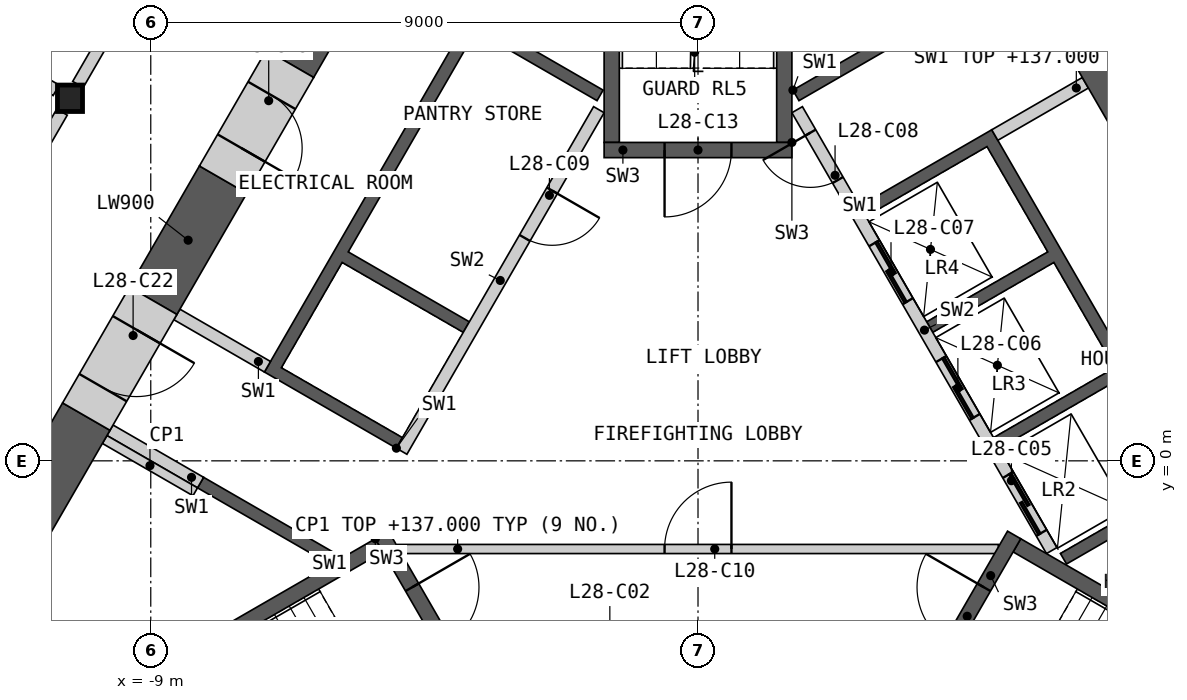
"""IFC4 building model, lengths in metres.
Left out: names, types, materials, properties, quantities, classifications, styles, units other than length and angle.
Written with IfcOpenShell. Run it as: python <this file> out.ifc"""

import sys

from ifc_helpers import new_model, si_unit, direction, frame, frame_2d, origin, origin_2d, place, context, subcontext, project, spatial, polyline, rectangle, i_section, outline, extrude, element, fill, save


model = new_model("IFC4")
c1 = context("Model", 3, precision=1e-05, world=origin(), true_north=direction((0.0, 1.0)))
c2 = subcontext(c1, "Body", "Model", "MODEL_VIEW")
j1 = project(units=[si_unit("LENGTHUNIT", "METRE"), si_unit("PLANEANGLEUNIT", "RADIAN")], contexts=[c1])
p1 = place(None, origin())
s1 = spatial("IfcSite", under=j1, at=p1, CompositionType="ELEMENT")
p2 = place(p1, origin())
s2 = spatial("IfcBuilding", under=s1, at=p2, CompositionType="ELEMENT")
p3 = place(p2, frame((0.0, 0.0, 133.2)))
s3 = spatial("IfcBuildingStorey", under=s2, at=p3, CompositionType="ELEMENT", Elevation=133.2)
p4 = place(p3, frame((-10.328, 5.963, 0.0), z_axis=(0.0, 0.0, 1.0), x_axis=(1.0, 0.0, 0.0)))
e1 = element("IfcColumn", 1, at=p4, inside=s3, PredefinedType="COLUMN", context=c2, shape_type="SweptSolid", body=[
    extrude(i_section(OverallWidth=0.412, OverallDepth=0.435, WebThickness=0.036, FlangeThickness=0.057, at=origin_2d()), origin(), (0.0, 0.0, 1.0), 4.2),
])
p5 = place(p3, origin())
e2 = element("IfcWall", 2, at=p5, inside=s3, PredefinedType="SHEAR", context=c2, shape_type="SweptSolid", body=[
    extrude(outline(polyline([(1.561, 6.097), (3.731, 7.35), (3.831, 7.177), (1.66, 5.924), (1.561, 6.097)])), origin(), (0.0, 0.0, 1.0), 3.8),
])
p6 = place(p3, origin())
e3 = element("IfcWall", 3, at=p6, inside=s3, PredefinedType="SHEAR", context=c2, shape_type="SweptSolid", body=[
    extrude(outline(polyline([(2.66, 4.192), (4.831, 5.445), (8.231, -0.444), (6.061, -1.697), (5.96, -1.524), (7.952, -0.374), (6.952, 1.358), (4.96, 0.208), (4.861, 0.381), (6.852, 1.531), (5.852, 3.263), (3.861, 2.113), (3.76, 2.287), (5.752, 3.437), (4.752, 5.169), (2.76, 4.019), (2.66, 4.192)])), origin(), (0.0, 0.0, 1.0), 3.8),
])
p7 = place(p3, frame((5.817, -1.476, 0.0), z_axis=(0.0, 0.0, 1.0), x_axis=(-0.500002616675, 0.866023893041, 0.0)))
e4 = element("IfcWall", 4, at=p7, inside=s3, PredefinedType="SOLIDWALL", context=c2, shape_type="SweptSolid", body=[
    extrude(rectangle(XDim=8.373, YDim=0.2, at=frame_2d((4.187, 0.0))), origin(), (0.0, 0.0, 1.0), 3.8),
])
p8 = place(p7, frame((0.337, 0.0, 0.0)))
e5 = element("IfcOpeningElement", 5, at=p8, cuts=e4, PredefinedType="OPENING", context=c2, shape_type="SweptSolid", body=[
    extrude(rectangle(XDim=1.1, YDim=2.1, at=frame_2d((0.55, 1.05))), frame((0.0, 0.11, 0.0), z_axis=(0.0, -1.0, 0.0), x_axis=(1.0, 0.0, 0.0)), (0.0, 0.0, 1.0), 0.22),
])
p9 = place(p7, frame((2.537, 0.0, 0.0)))
e6 = element("IfcOpeningElement", 6, at=p9, cuts=e4, PredefinedType="OPENING", context=c2, shape_type="SweptSolid", body=[
    extrude(rectangle(XDim=1.1, YDim=2.1, at=frame_2d((0.55, 1.05))), frame((0.0, 0.11, 0.0), z_axis=(0.0, -1.0, 0.0), x_axis=(1.0, 0.0, 0.0)), (0.0, 0.0, 1.0), 0.22),
])
p10 = place(p7, frame((4.737, 0.0, 0.0)))
e7 = element("IfcOpeningElement", 7, at=p10, cuts=e4, PredefinedType="OPENING", context=c2, shape_type="SweptSolid", body=[
    extrude(rectangle(XDim=1.1, YDim=2.1, at=frame_2d((0.55, 1.05))), frame((0.0, 0.11, 0.0), z_axis=(0.0, -1.0, 0.0), x_axis=(1.0, 0.0, 0.0)), (0.0, 0.0, 1.0), 0.22),
])
p11 = place(p7, frame((7.037, 0.0, 0.0)))
e8 = element("IfcOpeningElement", 8, at=p11, cuts=e4, PredefinedType="OPENING", context=c2, shape_type="SweptSolid", body=[
    extrude(rectangle(XDim=0.9, YDim=2.1, at=frame_2d((0.45, 1.05))), frame((0.0, 0.11, 0.0), z_axis=(0.0, -1.0, 0.0), x_axis=(1.0, 0.0, 0.0)), (0.0, 0.0, 1.0), 0.22),
])
p12 = place(p3, frame((4.881, 5.358, 0.0), z_axis=(0.0, 0.0, 1.0), x_axis=(0.866024871741, 0.500000921525, 0.0)))
e9 = element("IfcWall", 9, at=p12, inside=s3, PredefinedType="SHEAR", context=c2, shape_type="SweptSolid", body=[
    extrude(rectangle(XDim=1.72, YDim=0.2, at=frame_2d((0.86, 0.0))), origin(), (0.0, 0.0, 1.0), 3.8),
])
p13 = place(p3, origin())
e10 = element("IfcWall", 10, at=p13, inside=s3, PredefinedType="SHEAR", context=c2, shape_type="SweptSolid", body=[
    extrude(outline(polyline([(-6.061, -1.697), (-8.231, -0.444), (-8.131, -0.271), (-5.96, -1.524), (-6.061, -1.697)])), origin(), (0.0, 0.0, 1.0), 3.8),
])
p14 = place(p3, origin())
e11 = element("IfcWall", 11, at=p14, inside=s3, PredefinedType="SHEAR", context=c2, shape_type="SweptSolid", body=[
    extrude(outline(polyline([(-4.96, 0.208), (-7.131, 1.461), (-3.731, 7.35), (-1.561, 6.097), (-1.66, 5.924), (-3.652, 7.074), (-5.752, 3.437), (-3.76, 2.287), (-3.861, 2.113), (-5.852, 3.263), (-6.852, 1.531), (-4.861, 0.381), (-4.96, 0.208)])), origin(), (0.0, 0.0, 1.0), 3.8),
])
p15 = place(p3, frame((-1.631, 5.776, 0.0), z_axis=(0.0, 0.0, 1.0), x_axis=(-0.499992876559, -0.866029516466, 0.0)))
e12 = element("IfcWall", 12, at=p15, inside=s3, PredefinedType="SOLIDWALL", context=c2, shape_type="SweptSolid", body=[
    extrude(rectangle(XDim=6.486, YDim=0.2, at=frame_2d((3.243, 0.0))), origin(), (0.0, 0.0, 1.0), 3.8),
])
p16 = place(p15, frame((1.537, 0.0, 0.0)))
e13 = element("IfcOpeningElement", 13, at=p16, cuts=e12, PredefinedType="OPENING", context=c2, shape_type="SweptSolid", body=[
    extrude(rectangle(XDim=0.9, YDim=2.1, at=frame_2d((0.45, 1.05))), frame((0.0, 0.11, 0.0), z_axis=(0.0, -1.0, 0.0), x_axis=(1.0, 0.0, 0.0)), (0.0, 0.0, 1.0), 0.22),
])
for number, where, z_axis, x_axis in (
    (14, (-7.081, 1.548, 0.0), (0.0, 0.0, 1.0), (-0.866, 0.5, 0.0)),
    (15, (-8.181, -0.357, 0.0), (0.0, 0.0, 1.0), (-0.866, 0.5, 0.0)),
):
    element("IfcWall", number, at=place(p3, frame(where, z_axis=z_axis, x_axis=x_axis)), inside=s3, PredefinedType="SHEAR", context=c2, shape_type="SweptSolid", body=[
        extrude(rectangle(XDim=1.72, YDim=0.2, at=frame_2d((0.86, 0.0))), origin(), (0.0, 0.0, 1.0), 3.8),
    ])
p17 = place(p3, frame((-4.941, -1.45, 0.0), z_axis=(0.0, 0.0, 1.0), x_axis=(1.0, 0.0, 0.0)))
e16 = element("IfcWall", 16, at=p17, inside=s3, PredefinedType="PARTITIONING", context=c2, shape_type="SweptSolid", body=[
    extrude(rectangle(XDim=9.882, YDim=0.15, at=frame_2d((4.941, 0.0))), origin(), (0.0, 0.0, 1.0), 3.8),
])
p18 = place(p17, frame((4.391, 0.0, 0.0)))
e17 = element("IfcOpeningElement", 17, at=p18, cuts=e16, PredefinedType="OPENING", context=c2, shape_type="SweptSolid", body=[
    extrude(rectangle(XDim=1.1, YDim=2.1, at=frame_2d((0.55, 1.05))), frame((0.0, 0.085, 0.0), z_axis=(0.0, -1.0, 0.0), x_axis=(1.0, 0.0, 0.0)), (0.0, 0.0, 1.0), 0.17),
])
p19 = place(p3, origin())
e18 = element("IfcWall", 18, at=p19, inside=s3, PredefinedType="SHEAR", context=c2, shape_type="SweptSolid", body=[
    extrude(outline(polyline([(-5.307, -1.281), (-10.374, -4.206), (-10.032, -4.298), (-5.182, -1.498), (-5.307, -1.281)])), origin(), (0.0, 0.0, 1.0), 3.8),
])
p20 = place(p3, frame((-5.199, -1.219, 0.0), z_axis=(0.0, 0.0, 1.0), x_axis=(0.499982516597, -0.866035497597, 0.0)))
e19 = element("IfcWall", 19, at=p20, inside=s3, PredefinedType="SHEAR", context=c2, shape_type="SweptSolid", body=[
    extrude(rectangle(XDim=3.088, YDim=0.25, at=frame_2d((1.544, 0.0))), origin(), (0.0, 0.0, 1.0), 3.8),
])
p21 = place(p20, frame((0.994, 0.0, 0.0)))
e20 = element("IfcOpeningElement", 20, at=p21, cuts=e19, PredefinedType="OPENING", context=c2, shape_type="SweptSolid", body=[
    extrude(rectangle(XDim=1.1, YDim=2.1, at=frame_2d((0.55, 1.05))), frame((0.0, 0.135, 0.0), z_axis=(0.0, -1.0, 0.0), x_axis=(1.0, 0.0, 0.0)), (0.0, 0.0, 1.0), 0.27),
])
p22 = place(p3, origin())
e21 = element("IfcWall", 21, at=p22, inside=s3, PredefinedType="SHEAR", context=c2, shape_type="SweptSolid", body=[
    extrude(outline(polyline([(10.032, -4.298), (10.374, -4.206), (5.307, -1.281), (5.182, -1.498), (10.032, -4.298)])), origin(), (0.0, 0.0, 1.0), 3.8),
])
p23 = place(p3, frame((3.655, -3.893, 0.0), z_axis=(0.0, 0.0, 1.0), x_axis=(0.499982516597, 0.866035497597, 0.0)))
e22 = element("IfcWall", 22, at=p23, inside=s3, PredefinedType="SHEAR", context=c2, shape_type="SweptSolid", body=[
    extrude(rectangle(XDim=3.088, YDim=0.25, at=frame_2d((1.544, 0.0))), origin(), (0.0, 0.0, 1.0), 3.8),
])
p24 = place(p23, frame((0.994, 0.0, 0.0)))
e23 = element("IfcOpeningElement", 23, at=p24, cuts=e22, PredefinedType="OPENING", context=c2, shape_type="SweptSolid", body=[
    extrude(rectangle(XDim=1.1, YDim=2.1, at=frame_2d((0.55, 1.05))), frame((0.0, 0.135, 0.0), z_axis=(0.0, -1.0, 0.0), x_axis=(1.0, 0.0, 0.0)), (0.0, 0.0, 1.0), 0.27),
])
p25 = place(p3, origin())
e24 = element("IfcWall", 24, at=p25, inside=s3, PredefinedType="SHEAR", context=c2, shape_type="SweptSolid", body=[
    extrude(outline(polyline([(1.544, 5.237), (1.544, 11.087), (1.294, 10.837), (1.294, 5.237), (1.544, 5.237)])), origin(), (0.0, 0.0, 1.0), 3.8),
])
p26 = place(p3, origin())
e25 = element("IfcWall", 25, at=p26, inside=s3, PredefinedType="SHEAR", context=c2, shape_type="SweptSolid", body=[
    extrude(outline(polyline([(-1.294, 10.837), (-1.544, 11.087), (-1.544, 5.237), (-1.294, 5.237), (-1.294, 10.837)])), origin(), (0.0, 0.0, 1.0), 3.8),
])
p27 = place(p3, frame((1.544, 5.112, 0.0), z_axis=(0.0, 0.0, 1.0), x_axis=(-1.0, 0.0, 0.0)))
e26 = element("IfcWall", 26, at=p27, inside=s3, PredefinedType="SHEAR", context=c2, shape_type="SweptSolid", body=[
    extrude(rectangle(XDim=3.088, YDim=0.25, at=frame_2d((1.544, 0.0))), origin(), (0.0, 0.0, 1.0), 3.8),
])
p28 = place(p27, frame((0.994, 0.0, 0.0)))
e27 = element("IfcOpeningElement", 27, at=p28, cuts=e26, PredefinedType="OPENING", context=c2, shape_type="SweptSolid", body=[
    extrude(rectangle(XDim=1.1, YDim=2.1, at=frame_2d((0.55, 1.05))), frame((0.0, 0.135, 0.0), z_axis=(0.0, -1.0, 0.0), x_axis=(1.0, 0.0, 0.0)), (0.0, 0.0, 1.0), 0.27),
])
p29 = place(p3, frame((-8.268, -0.509, 0.0), z_axis=(0.0, 0.0, 1.0), x_axis=(-0.866024871741, 0.500000921525, 0.0)))
e28 = element("IfcWall", 28, at=p29, inside=s3, PredefinedType="PARTITIONING", context=c2, shape_type="SweptSolid", body=[
    extrude(rectangle(XDim=1.72, YDim=0.15, at=frame_2d((0.86, 0.0))), origin(), (0.0, 0.0, 1.0), 3.8),
])
p30 = place(p3, frame((7.91, 4.451, 0.0), z_axis=(0.0, 0.0, 1.0), x_axis=(-0.500001962043, 0.866024270995, 0.0)))
e29 = element("IfcWall", 29, at=p30, inside=s3, PredefinedType="SHEAR", context=c2, shape_type="SweptSolid", body=[
    extrude(rectangle(XDim=8.796, YDim=0.9, at=frame_2d((4.398, 0.0))), origin(), (0.0, 0.0, 1.0), 3.8),
])
p31 = place(p3, frame((-10.06, 0.728, 0.0), z_axis=(0.0, 0.0, 1.0), x_axis=(-0.499996331799, -0.866027521611, 0.0)))
e30 = element("IfcWall", 30, at=p31, inside=s3, PredefinedType="SHEAR", context=c2, shape_type="SweptSolid", body=[
    extrude(rectangle(XDim=4.295, YDim=0.9, at=frame_2d((2.148, 0.0))), origin(), (0.0, 0.0, 1.0), 3.8),
])
p32 = place(p3, frame((-5.332, 8.917, 0.0), z_axis=(0.0, 0.0, 1.0), x_axis=(-0.499949934511, -0.866054307178, 0.0)))
e31 = element("IfcWall", 31, at=p32, inside=s3, PredefinedType="SHEAR", context=c2, shape_type="SweptSolid", body=[
    extrude(rectangle(XDim=2.756, YDim=0.9, at=frame_2d((1.378, 0.0))), origin(), (0.0, 0.0, 1.0), 3.8),
])
p33 = place(p3, frame((-7.81, 4.625, 0.0), z_axis=(0.0, 0.0, 1.0), x_axis=(-0.499952165731, -0.866053019151, 0.0)))
e32 = element("IfcWall", 32, at=p33, inside=s3, PredefinedType="SHEAR", context=c2, shape_type="SweptSolid", body=[
    extrude(rectangle(XDim=2.3, YDim=0.9, at=frame_2d((1.15, 0.0))), origin(), (0.0, 0.0, 1.0), 3.8),
])
p34 = place(p3, frame((-6.71, 6.53, 0.0), z_axis=(0.0, 0.0, 1.0), x_axis=(-0.50002983664, -0.866008176907, 0.0)))
e33 = element("IfcWall", 33, at=p34, inside=s3, PredefinedType="SHEAR", context=c2, shape_type="SweptSolid", body=[
    extrude(rectangle(XDim=2.2, YDim=0.9, at=frame_2d((1.1, 0.0))), origin(), (0.0, 0.0, 1.0), 3.8),
])
p35 = place(p34, frame((0.6, 0.0, 0.0)))
e34 = element("IfcOpeningElement", 34, at=p35, cuts=e33, PredefinedType="OPENING", context=c2, shape_type="SweptSolid", body=[
    extrude(rectangle(XDim=1.0, YDim=2.1, at=frame_2d((0.5, 1.05))), frame((0.0, 0.46, 0.0), z_axis=(0.0, -1.0, 0.0), x_axis=(1.0, 0.0, 0.0)), (0.0, 0.0, 1.0), 0.92),
])
p36 = place(p3, frame((-8.96, 2.633, 0.0), z_axis=(0.0, 0.0, 1.0), x_axis=(-0.50002983664, -0.866008176907, 0.0)))
e35 = element("IfcWall", 35, at=p36, inside=s3, PredefinedType="SHEAR", context=c2, shape_type="SweptSolid", body=[
    extrude(rectangle(XDim=2.2, YDim=0.9, at=frame_2d((1.1, 0.0))), origin(), (0.0, 0.0, 1.0), 3.8),
])
p37 = place(p36, frame((0.55, 0.0, 0.0)))
e36 = element("IfcOpeningElement", 36, at=p37, cuts=e35, PredefinedType="OPENING", context=c2, shape_type="SweptSolid", body=[
    extrude(rectangle(XDim=1.1, YDim=2.1, at=frame_2d((0.55, 1.05))), frame((0.0, 0.46, 0.0), z_axis=(0.0, -1.0, 0.0), x_axis=(1.0, 0.0, 0.0)), (0.0, 0.0, 1.0), 0.92),
])
p38 = place(p3, frame((-15.361, -2.754, 0.0), z_axis=(0.0, 0.0, 1.0), x_axis=(0.500004141693, 0.866023012564, 0.0)))
e37 = element("IfcWall", 37, at=p38, inside=s3, PredefinedType="PARTITIONING", context=c2, shape_type="SweptSolid", body=[
    extrude(rectangle(XDim=9.803, YDim=0.2, at=frame_2d((4.902, 0.0))), origin(), (0.0, 0.0, 1.0), 3.8),
])
p39 = place(p38, frame((4.452, 0.0, 0.0)))
e38 = element("IfcOpeningElement", 38, at=p39, cuts=e37, PredefinedType="OPENING", context=c2, shape_type="SweptSolid", body=[
    extrude(rectangle(XDim=1.0, YDim=2.1, at=frame_2d((0.5, 1.05))), frame((0.0, 0.11, 0.0), z_axis=(0.0, -1.0, 0.0), x_axis=(1.0, 0.0, 0.0)), (0.0, 0.0, 1.0), 0.22),
])
p40 = place(p3, frame((5.295, 14.68, 0.0), z_axis=(0.0, 0.0, 1.0), x_axis=(0.500012035596, -0.866018454918, 0.0)))
e39 = element("IfcWall", 39, at=p40, inside=s3, PredefinedType="PARTITIONING", context=c2, shape_type="SweptSolid", body=[
    extrude(rectangle(XDim=9.803, YDim=0.2, at=frame_2d((4.902, 0.0))), origin(), (0.0, 0.0, 1.0), 3.8),
])
p41 = place(p40, frame((4.052, 0.0, 0.0)))
e40 = element("IfcOpeningElement", 40, at=p41, cuts=e39, PredefinedType="OPENING", context=c2, shape_type="SweptSolid", body=[
    extrude(rectangle(XDim=1.8, YDim=2.1, at=frame_2d((0.9, 1.05))), frame((0.0, 0.11, 0.0), z_axis=(0.0, -1.0, 0.0), x_axis=(1.0, 0.0, 0.0)), (0.0, 0.0, 1.0), 0.22),
])
p42 = place(p3, frame((-10.197, 6.19, 0.0), z_axis=(0.0, 0.0, 1.0), x_axis=(0.500012035596, 0.866018454918, 0.0)))
e41 = element("IfcWall", 41, at=p42, inside=s3, PredefinedType="PARTITIONING", context=c2, shape_type="SweptSolid", body=[
    extrude(rectangle(XDim=9.803, YDim=0.2, at=frame_2d((4.902, 0.0))), origin(), (0.0, 0.0, 1.0), 3.8),
])
p43 = place(p42, frame((4.452, 0.0, 0.0)))
e42 = element("IfcOpeningElement", 42, at=p43, cuts=e41, PredefinedType="OPENING", context=c2, shape_type="SweptSolid", body=[
    extrude(rectangle(XDim=1.0, YDim=2.1, at=frame_2d((0.5, 1.05))), frame((0.0, 0.11, 0.0), z_axis=(0.0, -1.0, 0.0), x_axis=(1.0, 0.0, 0.0)), (0.0, 0.0, 1.0), 0.22),
])
p44 = place(p3, frame((-21.536, 12.434, 0.0), z_axis=(0.0, 0.0, 1.0), x_axis=(0.86602461759, -0.500001361726, 0.0)))
e43 = element("IfcWall", 43, at=p44, inside=s3, PredefinedType="PARTITIONING", context=c2, shape_type="SweptSolid", body=[
    extrude(rectangle(XDim=12.679, YDim=0.2, at=frame_2d((6.34, 0.0))), origin(), (0.0, 0.0, 1.0), 2.885),
])
p45 = place(p8, origin())
e44 = element("IfcDoor", 44, at=p45, inside=s3, OperationType="SLIDING_TO_LEFT", PredefinedType="DOOR", context=c2, shape_type="SweptSolid", body=[
    extrude(rectangle(XDim=1.1, YDim=2.1, at=frame_2d((0.55, 1.05))), frame((0.0, 0.025, 0.0), z_axis=(0.0, -1.0, 0.0), x_axis=(1.0, 0.0, 0.0)), (0.0, 0.0, 1.0), 0.05),
])
fill(e5, e44)
p46 = place(p9, origin())
e45 = element("IfcDoor", 45, at=p46, inside=s3, OperationType="SLIDING_TO_LEFT", PredefinedType="DOOR", context=c2, shape_type="SweptSolid", body=[
    extrude(rectangle(XDim=1.1, YDim=2.1, at=frame_2d((0.55, 1.05))), frame((0.0, 0.025, 0.0), z_axis=(0.0, -1.0, 0.0), x_axis=(1.0, 0.0, 0.0)), (0.0, 0.0, 1.0), 0.05),
])
fill(e6, e45)
p47 = place(p10, origin())
e46 = element("IfcDoor", 46, at=p47, inside=s3, OperationType="SLIDING_TO_LEFT", PredefinedType="DOOR", context=c2, shape_type="SweptSolid", body=[
    extrude(rectangle(XDim=1.1, YDim=2.1, at=frame_2d((0.55, 1.05))), frame((0.0, 0.025, 0.0), z_axis=(0.0, -1.0, 0.0), x_axis=(1.0, 0.0, 0.0)), (0.0, 0.0, 1.0), 0.05),
])
fill(e7, e46)
p48 = place(p11, origin())
e47 = element("IfcDoor", 47, at=p48, inside=s3, OperationType="SINGLE_SWING_RIGHT", PredefinedType="DOOR", context=c2, shape_type="SweptSolid", body=[
    extrude(rectangle(XDim=0.9, YDim=2.1, at=frame_2d((0.45, 1.05))), frame((0.0, 0.025, 0.0), z_axis=(0.0, -1.0, 0.0), x_axis=(1.0, 0.0, 0.0)), (0.0, 0.0, 1.0), 0.05),
])
fill(e8, e47)
p49 = place(p16, origin())
e48 = element("IfcDoor", 48, at=p49, inside=s3, OperationType="SINGLE_SWING_LEFT", PredefinedType="DOOR", context=c2, shape_type="SweptSolid", body=[
    extrude(rectangle(XDim=0.9, YDim=2.1, at=frame_2d((0.45, 1.05))), frame((0.0, 0.025, 0.0), z_axis=(0.0, -1.0, 0.0), x_axis=(1.0, 0.0, 0.0)), (0.0, 0.0, 1.0), 0.05),
])
fill(e13, e48)
p50 = place(p18, origin())
e49 = element("IfcDoor", 49, at=p50, inside=s3, OperationType="SINGLE_SWING_RIGHT", PredefinedType="DOOR", context=c2, shape_type="SweptSolid", body=[
    extrude(rectangle(XDim=1.1, YDim=2.1, at=frame_2d((0.55, 1.05))), frame((0.0, 0.025, 0.0), z_axis=(0.0, -1.0, 0.0), x_axis=(1.0, 0.0, 0.0)), (0.0, 0.0, 1.0), 0.05),
])
fill(e17, e49)
p51 = place(p21, origin())
e50 = element("IfcDoor", 50, at=p51, inside=s3, OperationType="SINGLE_SWING_LEFT", PredefinedType="DOOR", context=c2, shape_type="SweptSolid", body=[
    extrude(rectangle(XDim=1.1, YDim=2.1, at=frame_2d((0.55, 1.05))), frame((0.0, 0.025, 0.0), z_axis=(0.0, -1.0, 0.0), x_axis=(1.0, 0.0, 0.0)), (0.0, 0.0, 1.0), 0.05),
])
fill(e20, e50)
p52 = place(p24, origin())
e51 = element("IfcDoor", 51, at=p52, inside=s3, OperationType="SINGLE_SWING_RIGHT", PredefinedType="DOOR", context=c2, shape_type="SweptSolid", body=[
    extrude(rectangle(XDim=1.1, YDim=2.1, at=frame_2d((0.55, 1.05))), frame((0.0, 0.025, 0.0), z_axis=(0.0, -1.0, 0.0), x_axis=(1.0, 0.0, 0.0)), (0.0, 0.0, 1.0), 0.05),
])
fill(e23, e51)
p53 = place(p28, origin())
e52 = element("IfcDoor", 52, at=p53, inside=s3, OperationType="SINGLE_SWING_RIGHT", PredefinedType="DOOR", context=c2, shape_type="SweptSolid", body=[
    extrude(rectangle(XDim=1.1, YDim=2.1, at=frame_2d((0.55, 1.05))), frame((0.0, 0.025, 0.0), z_axis=(0.0, -1.0, 0.0), x_axis=(1.0, 0.0, 0.0)), (0.0, 0.0, 1.0), 0.05),
])
fill(e27, e52)
p54 = place(p35, origin())
e53 = element("IfcDoor", 53, at=p54, inside=s3, OperationType="SINGLE_SWING_RIGHT", PredefinedType="DOOR", context=c2, shape_type="SweptSolid", body=[
    extrude(rectangle(XDim=1.0, YDim=2.1, at=frame_2d((0.5, 1.05))), frame((0.0, 0.205, 0.0), z_axis=(0.0, -1.0, 0.0), x_axis=(1.0, 0.0, 0.0)), (0.0, 0.0, 1.0), 0.05),
])
fill(e34, e53)
p55 = place(p37, origin())
e54 = element("IfcDoor", 54, at=p55, inside=s3, OperationType="SINGLE_SWING_LEFT", PredefinedType="DOOR", context=c2, shape_type="SweptSolid", body=[
    extrude(rectangle(XDim=1.1, YDim=2.1, at=frame_2d((0.55, 1.05))), frame((0.0, 0.205, 0.0), z_axis=(0.0, -1.0, 0.0), x_axis=(1.0, 0.0, 0.0)), (0.0, 0.0, 1.0), 0.05),
])
fill(e36, e54)
save(model, sys.argv[1])
